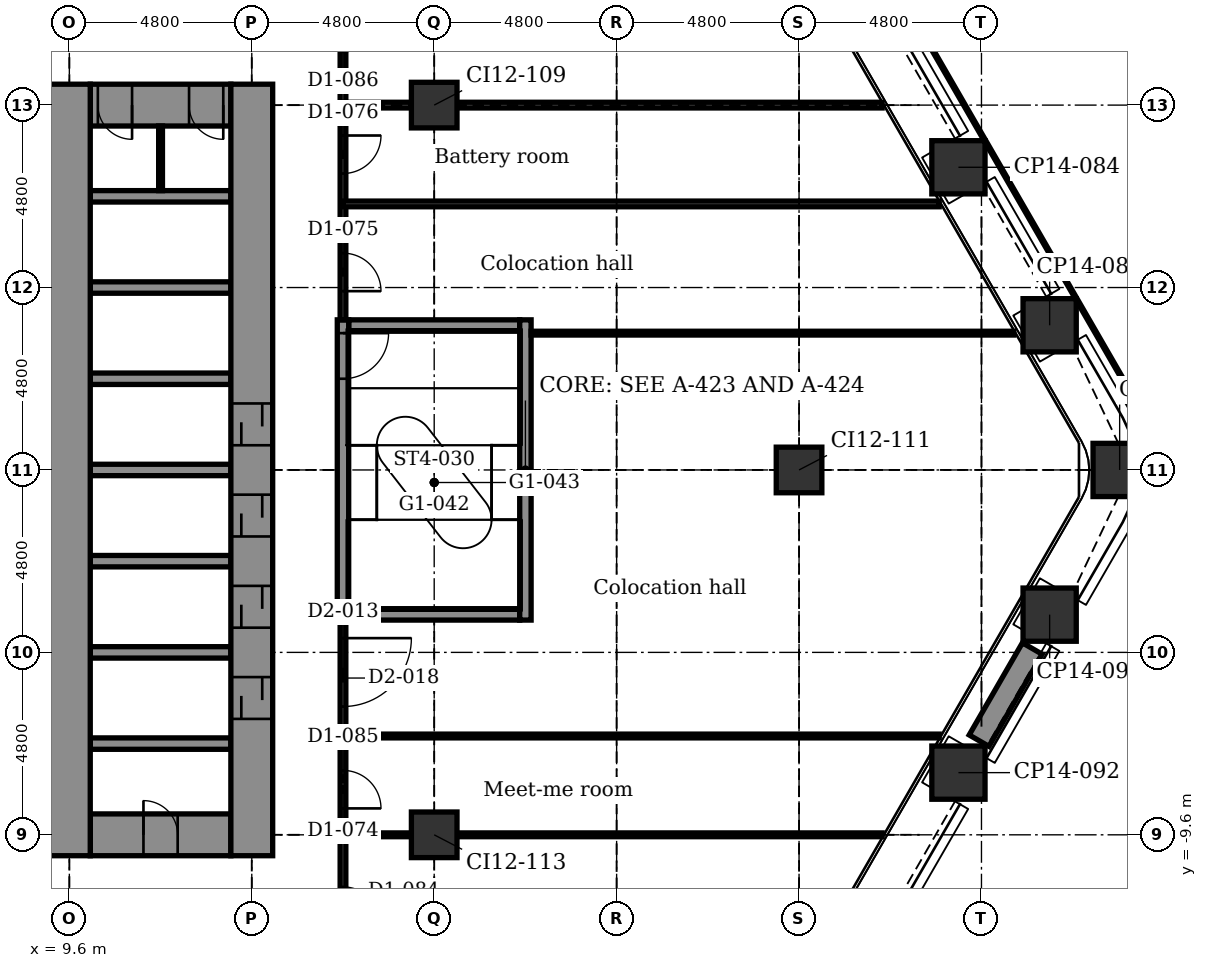
"""IFC4 building model, lengths in metres.
Left out: names, types, materials, properties, quantities, classifications, styles, units other than length and angle.
Written with IfcOpenShell. Run it as: python <this file> out.ifc"""

import sys

from ifc_helpers import new_model, si_unit, direction, frame, frame_2d, origin, origin_2d, place, context, subcontext, project, spatial, rectangle, extrude, element, fill, save


model = new_model("IFC4")
c1 = context("Model", 3, precision=1e-05, world=origin(), true_north=direction((0.0, 1.0)))
c2 = subcontext(c1, "Body", "Model", "MODEL_VIEW")
j1 = project(units=[si_unit("LENGTHUNIT", "METRE"), si_unit("PLANEANGLEUNIT", "RADIAN")], contexts=[c1])
p1 = place(None, origin())
s1 = spatial("IfcSite", under=j1, at=p1, CompositionType="ELEMENT")
p2 = place(p1, origin())
s2 = spatial("IfcBuilding", under=s1, at=p2, CompositionType="ELEMENT")
p3 = place(p2, frame((0.0, 0.0, 22.4)))
s3 = spatial("IfcBuildingStorey", under=s2, at=p3, CompositionType="ELEMENT", Elevation=22.4)
for number, where, z_axis, x_axis in (
    (1, (32.994, 7.964, -0.25), (0.0, 0.0, 1.0), (0.866, 0.5, 0.0)),
    (2, (35.394, 3.807, -0.25), (0.0, 0.0, 1.0), (0.866, 0.5, 0.0)),
    (3, (37.236, 0.0, -0.25), (0.0, 0.0, 1.0), (1.0, 0.0, 0.0)),
    (4, (35.394, -3.807, -0.25), (0.0, 0.0, 1.0), (0.5, 0.866, 0.0)),
    (5, (32.994, -7.964, -0.25), (0.0, 0.0, 1.0), (0.5, 0.866, 0.0)),
):
    element("IfcColumn", number, at=place(p3, frame(where, z_axis=z_axis, x_axis=x_axis)), inside=s3, PredefinedType="COLUMN", context=c2, shape_type="SweptSolid", body=[
        extrude(rectangle(XDim=1.4, YDim=1.4, at=origin_2d()), origin(), (0.0, 0.0, 1.0), 5.5),
    ])
for number, where, z_axis, x_axis in (
    (6, (19.2, -9.6, -0.25), (0.0, 0.0, 1.0), (1.0, 0.0, 0.0)),
    (7, (19.2, 9.6, -0.25), (0.0, 0.0, 1.0), (1.0, 0.0, 0.0)),
    (8, (28.8, 0.0, -0.25), (0.0, 0.0, 1.0), (1.0, 0.0, 0.0)),
):
    element("IfcColumn", number, at=place(p3, frame(where, z_axis=z_axis, x_axis=x_axis)), inside=s3, PredefinedType="COLUMN", context=c2, shape_type="SweptSolid", body=[
        extrude(rectangle(XDim=1.2, YDim=1.2, at=origin_2d()), origin(), (0.0, 0.0, 1.0), 5.5),
    ])
p4 = place(p3, frame((10.15, -9.6, -0.25), z_axis=(0.0, 0.0, 1.0), x_axis=(1.0, 0.0, 0.0)))
e9 = element("IfcWall", 9, at=p4, inside=s3, PredefinedType="SHEAR", context=c2, shape_type="SweptSolid", body=[
    extrude(rectangle(XDim=3.7, YDim=1.1, at=frame_2d((1.85, 0.0))), origin(), (0.0, 0.0, 1.0), 5.5),
])
p5 = place(p4, frame((1.4, 0.0, 0.25)))
e10 = element("IfcOpeningElement", 10, at=p5, cuts=e9, PredefinedType="OPENING", context=c2, shape_type="SweptSolid", body=[
    extrude(rectangle(XDim=0.9, YDim=2.1, at=frame_2d((0.45, 1.05))), frame((0.0, 0.56, 0.0), z_axis=(0.0, -1.0, 0.0), x_axis=(1.0, 0.0, 0.0)), (0.0, 0.0, 1.0), 1.12),
])
for number, where, z_axis, x_axis in (
    (11, (10.15, -7.2, -0.25), (0.0, 0.0, 1.0), (1.0, 0.0, 0.0)),
    (12, (10.15, -4.8, -0.25), (0.0, 0.0, 1.0), (1.0, 0.0, 0.0)),
):
    element("IfcWall", number, at=place(p3, frame(where, z_axis=z_axis, x_axis=x_axis)), inside=s3, PredefinedType="STANDARD", context=c2, shape_type="SweptSolid", body=[
        extrude(rectangle(XDim=3.7, YDim=0.3, at=frame_2d((1.85, 0.0))), origin(), (0.0, 0.0, 1.0), 5.5),
    ])
p6 = place(p3, frame((16.95, -3.8, -0.25), z_axis=(0.0, 0.0, 1.0), x_axis=(1.0, 0.0, 0.0)))
e13 = element("IfcWall", 13, at=p6, inside=s3, PredefinedType="STANDARD", context=c2, shape_type="SweptSolid", body=[
    extrude(rectangle(XDim=4.5, YDim=0.3, at=frame_2d((2.25, 0.0))), origin(), (0.0, 0.0, 1.0), 5.5),
])
for number, where, z_axis, x_axis in (
    (14, (10.15, -2.4, -0.25), (0.0, 0.0, 1.0), (1.0, 0.0, 0.0)),
    (15, (10.15, 0.0, -0.25), (0.0, 0.0, 1.0), (1.0, 0.0, 0.0)),
    (16, (10.15, 2.4, -0.25), (0.0, 0.0, 1.0), (1.0, 0.0, 0.0)),
):
    element("IfcWall", number, at=place(p3, frame(where, z_axis=z_axis, x_axis=x_axis)), inside=s3, PredefinedType="STANDARD", context=c2, shape_type="SweptSolid", body=[
        extrude(rectangle(XDim=3.7, YDim=0.3, at=frame_2d((1.85, 0.0))), origin(), (0.0, 0.0, 1.0), 5.5),
    ])
p7 = place(p3, frame((16.95, 3.8, -0.25), z_axis=(0.0, 0.0, 1.0), x_axis=(1.0, 0.0, 0.0)))
e17 = element("IfcWall", 17, at=p7, inside=s3, PredefinedType="STANDARD", context=c2, shape_type="SweptSolid", body=[
    extrude(rectangle(XDim=4.5, YDim=0.3, at=frame_2d((2.25, 0.0))), origin(), (0.0, 0.0, 1.0), 5.5),
])
for number, where, z_axis, x_axis in (
    (18, (10.15, 4.8, -0.25), (0.0, 0.0, 1.0), (1.0, 0.0, 0.0)),
    (19, (10.15, 7.2, -0.25), (0.0, 0.0, 1.0), (1.0, 0.0, 0.0)),
):
    element("IfcWall", number, at=place(p3, frame(where, z_axis=z_axis, x_axis=x_axis)), inside=s3, PredefinedType="STANDARD", context=c2, shape_type="SweptSolid", body=[
        extrude(rectangle(XDim=3.7, YDim=0.3, at=frame_2d((1.85, 0.0))), origin(), (0.0, 0.0, 1.0), 5.5),
    ])
p8 = place(p3, frame((10.15, 9.6, -0.25), z_axis=(0.0, 0.0, 1.0), x_axis=(1.0, 0.0, 0.0)))
e20 = element("IfcWall", 20, at=p8, inside=s3, PredefinedType="SHEAR", context=c2, shape_type="SweptSolid", body=[
    extrude(rectangle(XDim=3.7, YDim=1.1, at=frame_2d((1.85, 0.0))), origin(), (0.0, 0.0, 1.0), 5.5),
])
p9 = place(p8, frame((0.2, 0.0, 0.25)))
e21 = element("IfcOpeningElement", 21, at=p9, cuts=e20, PredefinedType="OPENING", context=c2, shape_type="SweptSolid", body=[
    extrude(rectangle(XDim=0.9, YDim=2.1, at=frame_2d((0.45, 1.05))), frame((0.0, 0.56, 0.0), z_axis=(0.0, -1.0, 0.0), x_axis=(1.0, 0.0, 0.0)), (0.0, 0.0, 1.0), 1.12),
])
p10 = place(p8, frame((2.6, 0.0, 0.25)))
e22 = element("IfcOpeningElement", 22, at=p10, cuts=e20, PredefinedType="OPENING", context=c2, shape_type="SweptSolid", body=[
    extrude(rectangle(XDim=0.9, YDim=2.1, at=frame_2d((0.45, 1.05))), frame((0.0, 0.56, 0.0), z_axis=(0.0, -1.0, 0.0), x_axis=(1.0, 0.0, 0.0)), (0.0, 0.0, 1.0), 1.12),
])
p11 = place(p3, frame((9.6, -10.15, -0.25), z_axis=(0.0, 0.0, 1.0), x_axis=(0.0, 1.0, 0.0)))
e23 = element("IfcWall", 23, at=p11, inside=s3, PredefinedType="SHEAR", context=c2, shape_type="SweptSolid", body=[
    extrude(rectangle(XDim=20.3, YDim=1.1, at=frame_2d((10.15, 0.0))), origin(), (0.0, 0.0, 1.0), 5.5),
])
p12 = place(p3, frame((14.4, -10.15, -0.25), z_axis=(0.0, 0.0, 1.0), x_axis=(0.0, 1.0, 0.0)))
e24 = element("IfcWall", 24, at=p12, inside=s3, PredefinedType="SHEAR", context=c2, shape_type="SweptSolid", body=[
    extrude(rectangle(XDim=20.3, YDim=1.1, at=frame_2d((10.15, 0.0))), origin(), (0.0, 0.0, 1.0), 5.5),
])
p13 = place(p12, frame((3.6, 0.0, 0.25)))
e25 = element("IfcOpeningElement", 25, at=p13, cuts=e24, PredefinedType="OPENING", context=c2, shape_type="SweptSolid", body=[
    extrude(rectangle(XDim=1.1, YDim=2.1, at=frame_2d((0.55, 1.05))), frame((0.0, 0.56, 0.0), z_axis=(0.0, -1.0, 0.0), x_axis=(1.0, 0.0, 0.0)), (0.0, 0.0, 1.0), 1.12),
])
p14 = place(p12, frame((6.0, 0.0, 0.25)))
e26 = element("IfcOpeningElement", 26, at=p14, cuts=e24, PredefinedType="OPENING", context=c2, shape_type="SweptSolid", body=[
    extrude(rectangle(XDim=1.1, YDim=2.1, at=frame_2d((0.55, 1.05))), frame((0.0, 0.56, 0.0), z_axis=(0.0, -1.0, 0.0), x_axis=(1.0, 0.0, 0.0)), (0.0, 0.0, 1.0), 1.12),
])
p15 = place(p12, frame((8.4, 0.0, 0.25)))
e27 = element("IfcOpeningElement", 27, at=p15, cuts=e24, PredefinedType="OPENING", context=c2, shape_type="SweptSolid", body=[
    extrude(rectangle(XDim=1.1, YDim=2.1, at=frame_2d((0.55, 1.05))), frame((0.0, 0.56, 0.0), z_axis=(0.0, -1.0, 0.0), x_axis=(1.0, 0.0, 0.0)), (0.0, 0.0, 1.0), 1.12),
])
p16 = place(p12, frame((10.8, 0.0, 0.25)))
e28 = element("IfcOpeningElement", 28, at=p16, cuts=e24, PredefinedType="OPENING", context=c2, shape_type="SweptSolid", body=[
    extrude(rectangle(XDim=1.1, YDim=2.1, at=frame_2d((0.55, 1.05))), frame((0.0, 0.56, 0.0), z_axis=(0.0, -1.0, 0.0), x_axis=(1.0, 0.0, 0.0)), (0.0, 0.0, 1.0), 1.12),
])
p17 = place(p3, frame((16.8, -3.95, -0.25), z_axis=(0.0, 0.0, 1.0), x_axis=(0.0, 1.0, 0.0)))
e29 = element("IfcWall", 29, at=p17, inside=s3, PredefinedType="STANDARD", context=c2, shape_type="SweptSolid", body=[
    extrude(rectangle(XDim=7.9, YDim=0.3, at=frame_2d((3.95, 0.0))), origin(), (0.0, 0.0, 1.0), 5.5),
])
p18 = place(p17, frame((6.35, 0.0, 0.25)))
e30 = element("IfcOpeningElement", 30, at=p18, cuts=e29, PredefinedType="OPENING", context=c2, shape_type="SweptSolid", body=[
    extrude(rectangle(XDim=1.2, YDim=2.1, at=frame_2d((0.6, 1.05))), frame((0.0, 0.16, 0.0), z_axis=(0.0, -1.0, 0.0), x_axis=(1.0, 0.0, 0.0)), (0.0, 0.0, 1.0), 0.32),
])
p19 = place(p3, frame((21.6, -3.95, -0.25), z_axis=(0.0, 0.0, 1.0), x_axis=(0.0, 1.0, 0.0)))
e31 = element("IfcWall", 31, at=p19, inside=s3, PredefinedType="STANDARD", context=c2, shape_type="SweptSolid", body=[
    extrude(rectangle(XDim=7.9, YDim=0.3, at=frame_2d((3.95, 0.0))), origin(), (0.0, 0.0, 1.0), 5.5),
])
p20 = place(p3, frame((34.937, -4.698, 0.0), z_axis=(0.0, 0.0, 1.0), x_axis=(-0.49998411664, -0.866034573852, 0.0)))
e32 = element("IfcWall", 32, at=p20, inside=s3, PredefinedType="USERDEFINED", context=c2, shape_type="SweptSolid", body=[
    extrude(rectangle(XDim=2.8, YDim=0.6, at=frame_2d((1.4, 0.0))), origin(), (0.0, 0.0, 1.0), 0.7),
])
p21 = place(p3, frame((16.8, -12.7, 0.0), z_axis=(0.0, 0.0, 1.0), x_axis=(0.0, 1.0, 0.0)))
e33 = element("IfcWall", 33, at=p21, inside=s3, PredefinedType="PARTITIONING", context=c2, shape_type="SweptSolid", body=[
    extrude(rectangle(XDim=8.75, YDim=0.15, at=frame_2d((4.375, 0.0))), origin(), (0.0, 0.0, 1.0), 5.25),
])
p22 = place(p21, frame((0.73, 0.0, 0.0)))
e34 = element("IfcOpeningElement", 34, at=p22, cuts=e33, PredefinedType="OPENING", context=c2, shape_type="SweptSolid", body=[
    extrude(rectangle(XDim=1.0, YDim=2.1, at=frame_2d((0.5, 1.05))), frame((0.0, 0.085, 0.0), z_axis=(0.0, -1.0, 0.0), x_axis=(1.0, 0.0, 0.0)), (0.0, 0.0, 1.0), 0.17),
])
p23 = place(p21, frame((3.795, 0.0, 0.0)))
e35 = element("IfcOpeningElement", 35, at=p23, cuts=e33, PredefinedType="OPENING", context=c2, shape_type="SweptSolid", body=[
    extrude(rectangle(XDim=1.0, YDim=2.1, at=frame_2d((0.5, 1.05))), frame((0.0, 0.085, 0.0), z_axis=(0.0, -1.0, 0.0), x_axis=(1.0, 0.0, 0.0)), (0.0, 0.0, 1.0), 0.17),
])
p24 = place(p21, frame((6.475, 0.0, 0.0)))
e36 = element("IfcOpeningElement", 36, at=p24, cuts=e33, PredefinedType="OPENING", context=c2, shape_type="SweptSolid", body=[
    extrude(rectangle(XDim=1.8, YDim=2.1, at=frame_2d((0.9, 1.05))), frame((0.0, 0.085, 0.0), z_axis=(0.0, -1.0, 0.0), x_axis=(1.0, 0.0, 0.0)), (0.0, 0.0, 1.0), 0.17),
])
p25 = place(p3, frame((16.8, 3.95, 0.0), z_axis=(0.0, 0.0, 1.0), x_axis=(0.0, 1.0, 0.0)))
e37 = element("IfcWall", 37, at=p25, inside=s3, PredefinedType="PARTITIONING", context=c2, shape_type="SweptSolid", body=[
    extrude(rectangle(XDim=9.05, YDim=0.15, at=frame_2d((4.525, 0.0))), origin(), (0.0, 0.0, 1.0), 5.25),
])
p26 = place(p25, frame((0.755, 0.0, 0.0)))
e38 = element("IfcOpeningElement", 38, at=p26, cuts=e37, PredefinedType="OPENING", context=c2, shape_type="SweptSolid", body=[
    extrude(rectangle(XDim=1.0, YDim=2.1, at=frame_2d((0.5, 1.05))), frame((0.0, 0.085, 0.0), z_axis=(0.0, -1.0, 0.0), x_axis=(1.0, 0.0, 0.0)), (0.0, 0.0, 1.0), 0.17),
])
p27 = place(p25, frame((3.85, 0.0, 0.0)))
e39 = element("IfcOpeningElement", 39, at=p27, cuts=e37, PredefinedType="OPENING", context=c2, shape_type="SweptSolid", body=[
    extrude(rectangle(XDim=1.0, YDim=2.1, at=frame_2d((0.5, 1.05))), frame((0.0, 0.085, 0.0), z_axis=(0.0, -1.0, 0.0), x_axis=(1.0, 0.0, 0.0)), (0.0, 0.0, 1.0), 0.17),
])
p28 = place(p25, frame((7.05, 0.0, 0.0)))
e40 = element("IfcOpeningElement", 40, at=p28, cuts=e37, PredefinedType="OPENING", context=c2, shape_type="SweptSolid", body=[
    extrude(rectangle(XDim=1.0, YDim=2.1, at=frame_2d((0.5, 1.05))), frame((0.0, 0.085, 0.0), z_axis=(0.0, -1.0, 0.0), x_axis=(1.0, 0.0, 0.0)), (0.0, 0.0, 1.0), 0.17),
])
p29 = place(p3, frame((12.0, 7.35, 0.0), z_axis=(0.0, 0.0, 1.0), x_axis=(0.0, 1.0, 0.0)))
e41 = element("IfcWall", 41, at=p29, inside=s3, PredefinedType="PARTITIONING", context=c2, shape_type="SweptSolid", body=[
    extrude(rectangle(XDim=1.7, YDim=0.1, at=frame_2d((0.85, 0.0))), origin(), (0.0, 0.0, 1.0), 5.25),
])
p30 = place(p3, frame((16.8, -9.6, 0.0), z_axis=(0.0, 0.0, 1.0), x_axis=(1.0, 0.0, 0.0)))
e42 = element("IfcWall", 42, at=p30, inside=s3, PredefinedType="PARTITIONING", context=c2, shape_type="SweptSolid", body=[
    extrude(rectangle(XDim=1.8, YDim=0.1, at=frame_2d((0.9, 0.0))), origin(), (0.0, 0.0, 1.0), 4.642),
])
p31 = place(p3, frame((19.8, -9.6, 0.0), z_axis=(0.0, 0.0, 1.0), x_axis=(1.0, 0.0, 0.0)))
e43 = element("IfcWall", 43, at=p31, inside=s3, PredefinedType="PARTITIONING", context=c2, shape_type="SweptSolid", body=[
    extrude(rectangle(XDim=11.187, YDim=0.1, at=frame_2d((5.593, 0.0))), origin(), (0.0, 0.0, 1.0), 4.488),
])
p32 = place(p3, frame((16.8, -7.0, 0.0), z_axis=(0.0, 0.0, 1.0), x_axis=(1.0, 0.0, 0.0)))
e44 = element("IfcWall", 44, at=p32, inside=s3, PredefinedType="PARTITIONING", context=c2, shape_type="SweptSolid", body=[
    extrude(rectangle(XDim=15.688, YDim=0.1, at=frame_2d((7.844, 0.0))), origin(), (0.0, 0.0, 1.0), 5.25),
])
p33 = place(p3, frame((21.75, 3.6, 0.0), z_axis=(0.0, 0.0, 1.0), x_axis=(1.0, 0.0, 0.0)))
e45 = element("IfcWall", 45, at=p33, inside=s3, PredefinedType="PARTITIONING", context=c2, shape_type="SweptSolid", body=[
    extrude(rectangle(XDim=12.701, YDim=0.1, at=frame_2d((6.351, 0.0))), origin(), (0.0, 0.0, 1.0), 5.25),
])
p34 = place(p3, frame((16.8, 7.0, 0.0), z_axis=(0.0, 0.0, 1.0), x_axis=(1.0, 0.0, 0.0)))
e46 = element("IfcWall", 46, at=p34, inside=s3, PredefinedType="PARTITIONING", context=c2, shape_type="SweptSolid", body=[
    extrude(rectangle(XDim=15.688, YDim=0.15, at=frame_2d((7.844, 0.0))), origin(), (0.0, 0.0, 1.0), 5.25),
])
p35 = place(p3, frame((16.8, 9.6, 0.0), z_axis=(0.0, 0.0, 1.0), x_axis=(1.0, 0.0, 0.0)))
e47 = element("IfcWall", 47, at=p35, inside=s3, PredefinedType="PARTITIONING", context=c2, shape_type="SweptSolid", body=[
    extrude(rectangle(XDim=1.8, YDim=0.15, at=frame_2d((0.9, 0.0))), origin(), (0.0, 0.0, 1.0), 4.642),
])
p36 = place(p3, frame((19.8, 9.6, 0.0), z_axis=(0.0, 0.0, 1.0), x_axis=(1.0, 0.0, 0.0)))
e48 = element("IfcWall", 48, at=p36, inside=s3, PredefinedType="PARTITIONING", context=c2, shape_type="SweptSolid", body=[
    extrude(rectangle(XDim=11.187, YDim=0.15, at=frame_2d((5.593, 0.0))), origin(), (0.0, 0.0, 1.0), 4.488),
])
p37 = place(p22, frame((1.0, 0.0, 0.0), z_axis=(0.0, 0.0, 1.0), x_axis=(-1.0, 0.0, 0.0)))
e49 = element("IfcDoor", 49, at=p37, inside=s3, OperationType="SINGLE_SWING_LEFT", PredefinedType="DOOR", context=c2, shape_type="SweptSolid", body=[
    extrude(rectangle(XDim=1.0, YDim=2.1, at=frame_2d((0.5, 1.05))), frame((0.0, 0.025, 0.0), z_axis=(0.0, -1.0, 0.0), x_axis=(1.0, 0.0, 0.0)), (0.0, 0.0, 1.0), 0.05),
])
fill(e34, e49)
p38 = place(p23, frame((1.0, 0.0, 0.0), z_axis=(0.0, 0.0, 1.0), x_axis=(-1.0, 0.0, 0.0)))
e50 = element("IfcDoor", 50, at=p38, inside=s3, OperationType="SINGLE_SWING_LEFT", PredefinedType="DOOR", context=c2, shape_type="SweptSolid", body=[
    extrude(rectangle(XDim=1.0, YDim=2.1, at=frame_2d((0.5, 1.05))), frame((0.0, 0.025, 0.0), z_axis=(0.0, -1.0, 0.0), x_axis=(1.0, 0.0, 0.0)), (0.0, 0.0, 1.0), 0.05),
])
fill(e35, e50)
p39 = place(p24, frame((1.8, 0.0, 0.0), z_axis=(0.0, 0.0, 1.0), x_axis=(-1.0, 0.0, 0.0)))
e51 = element("IfcDoor", 51, at=p39, inside=s3, OperationType="SINGLE_SWING_RIGHT", PredefinedType="DOOR", context=c2, shape_type="SweptSolid", body=[
    extrude(rectangle(XDim=1.8, YDim=2.1, at=frame_2d((0.9, 1.05))), frame((0.0, 0.025, 0.0), z_axis=(0.0, -1.0, 0.0), x_axis=(1.0, 0.0, 0.0)), (0.0, 0.0, 1.0), 0.05),
])
fill(e36, e51)
p40 = place(p26, frame((1.0, 0.0, 0.0), z_axis=(0.0, 0.0, 1.0), x_axis=(-1.0, 0.0, 0.0)))
e52 = element("IfcDoor", 52, at=p40, inside=s3, OperationType="SINGLE_SWING_LEFT", PredefinedType="DOOR", context=c2, shape_type="SweptSolid", body=[
    extrude(rectangle(XDim=1.0, YDim=2.1, at=frame_2d((0.5, 1.05))), frame((0.0, 0.025, 0.0), z_axis=(0.0, -1.0, 0.0), x_axis=(1.0, 0.0, 0.0)), (0.0, 0.0, 1.0), 0.05),
])
fill(e38, e52)
p41 = place(p27, frame((1.0, 0.0, 0.0), z_axis=(0.0, 0.0, 1.0), x_axis=(-1.0, 0.0, 0.0)))
e53 = element("IfcDoor", 53, at=p41, inside=s3, OperationType="SINGLE_SWING_RIGHT", PredefinedType="DOOR", context=c2, shape_type="SweptSolid", body=[
    extrude(rectangle(XDim=1.0, YDim=2.1, at=frame_2d((0.5, 1.05))), frame((0.0, 0.025, 0.0), z_axis=(0.0, -1.0, 0.0), x_axis=(1.0, 0.0, 0.0)), (0.0, 0.0, 1.0), 0.05),
])
fill(e39, e53)
p42 = place(p13, origin())
e54 = element("IfcDoor", 54, at=p42, inside=s3, OperationType="DOUBLE_DOOR_SLIDING", PredefinedType="DOOR", context=c2, shape_type="SweptSolid", body=[
    extrude(rectangle(XDim=1.1, YDim=2.1, at=frame_2d((0.55, 1.05))), frame((0.0, 0.025, 0.0), z_axis=(0.0, -1.0, 0.0), x_axis=(1.0, 0.0, 0.0)), (0.0, 0.0, 1.0), 0.05),
])
fill(e25, e54)
p43 = place(p14, origin())
e55 = element("IfcDoor", 55, at=p43, inside=s3, OperationType="DOUBLE_DOOR_SLIDING", PredefinedType="DOOR", context=c2, shape_type="SweptSolid", body=[
    extrude(rectangle(XDim=1.1, YDim=2.1, at=frame_2d((0.55, 1.05))), frame((0.0, 0.025, 0.0), z_axis=(0.0, -1.0, 0.0), x_axis=(1.0, 0.0, 0.0)), (0.0, 0.0, 1.0), 0.05),
])
fill(e26, e55)
p44 = place(p15, origin())
e56 = element("IfcDoor", 56, at=p44, inside=s3, OperationType="DOUBLE_DOOR_SLIDING", PredefinedType="DOOR", context=c2, shape_type="SweptSolid", body=[
    extrude(rectangle(XDim=1.1, YDim=2.1, at=frame_2d((0.55, 1.05))), frame((0.0, 0.025, 0.0), z_axis=(0.0, -1.0, 0.0), x_axis=(1.0, 0.0, 0.0)), (0.0, 0.0, 1.0), 0.05),
])
fill(e27, e56)
p45 = place(p16, origin())
e57 = element("IfcDoor", 57, at=p45, inside=s3, OperationType="DOUBLE_DOOR_SLIDING", PredefinedType="DOOR", context=c2, shape_type="SweptSolid", body=[
    extrude(rectangle(XDim=1.1, YDim=2.1, at=frame_2d((0.55, 1.05))), frame((0.0, 0.025, 0.0), z_axis=(0.0, -1.0, 0.0), x_axis=(1.0, 0.0, 0.0)), (0.0, 0.0, 1.0), 0.05),
])
fill(e28, e57)
p46 = place(p18, frame((1.2, 0.0, 0.0), z_axis=(0.0, 0.0, 1.0), x_axis=(-1.0, 0.0, 0.0)))
e58 = element("IfcDoor", 58, at=p46, inside=s3, OperationType="SINGLE_SWING_RIGHT", PredefinedType="DOOR", context=c2, shape_type="SweptSolid", body=[
    extrude(rectangle(XDim=1.2, YDim=2.1, at=frame_2d((0.6, 1.05))), frame((0.0, 0.025, 0.0), z_axis=(0.0, -1.0, 0.0), x_axis=(1.0, 0.0, 0.0)), (0.0, 0.0, 1.0), 0.05),
])
fill(e30, e58)
p47 = place(p5, origin())
e59 = element("IfcDoor", 59, at=p47, inside=s3, OperationType="SINGLE_SWING_LEFT", PredefinedType="DOOR", context=c2, shape_type="SweptSolid", body=[
    extrude(rectangle(XDim=0.9, YDim=2.1, at=frame_2d((0.45, 1.05))), frame((0.0, 0.025, 0.0), z_axis=(0.0, -1.0, 0.0), x_axis=(1.0, 0.0, 0.0)), (0.0, 0.0, 1.0), 0.05),
])
fill(e10, e59)
p48 = place(p9, frame((0.9, 0.0, 0.0), z_axis=(0.0, 0.0, 1.0), x_axis=(-1.0, 0.0, 0.0)))
e60 = element("IfcDoor", 60, at=p48, inside=s3, OperationType="SINGLE_SWING_RIGHT", PredefinedType="DOOR", context=c2, shape_type="SweptSolid", body=[
    extrude(rectangle(XDim=0.9, YDim=2.1, at=frame_2d((0.45, 1.05))), frame((0.0, 0.025, 0.0), z_axis=(0.0, -1.0, 0.0), x_axis=(1.0, 0.0, 0.0)), (0.0, 0.0, 1.0), 0.05),
])
fill(e21, e60)
p49 = place(p10, frame((0.9, 0.0, 0.0), z_axis=(0.0, 0.0, 1.0), x_axis=(-1.0, 0.0, 0.0)))
e61 = element("IfcDoor", 61, at=p49, inside=s3, OperationType="SINGLE_SWING_RIGHT", PredefinedType="DOOR", context=c2, shape_type="SweptSolid", body=[
    extrude(rectangle(XDim=0.9, YDim=2.1, at=frame_2d((0.45, 1.05))), frame((0.0, 0.025, 0.0), z_axis=(0.0, -1.0, 0.0), x_axis=(1.0, 0.0, 0.0)), (0.0, 0.0, 1.0), 0.05),
])
fill(e22, e61)
save(model, sys.argv[1])
